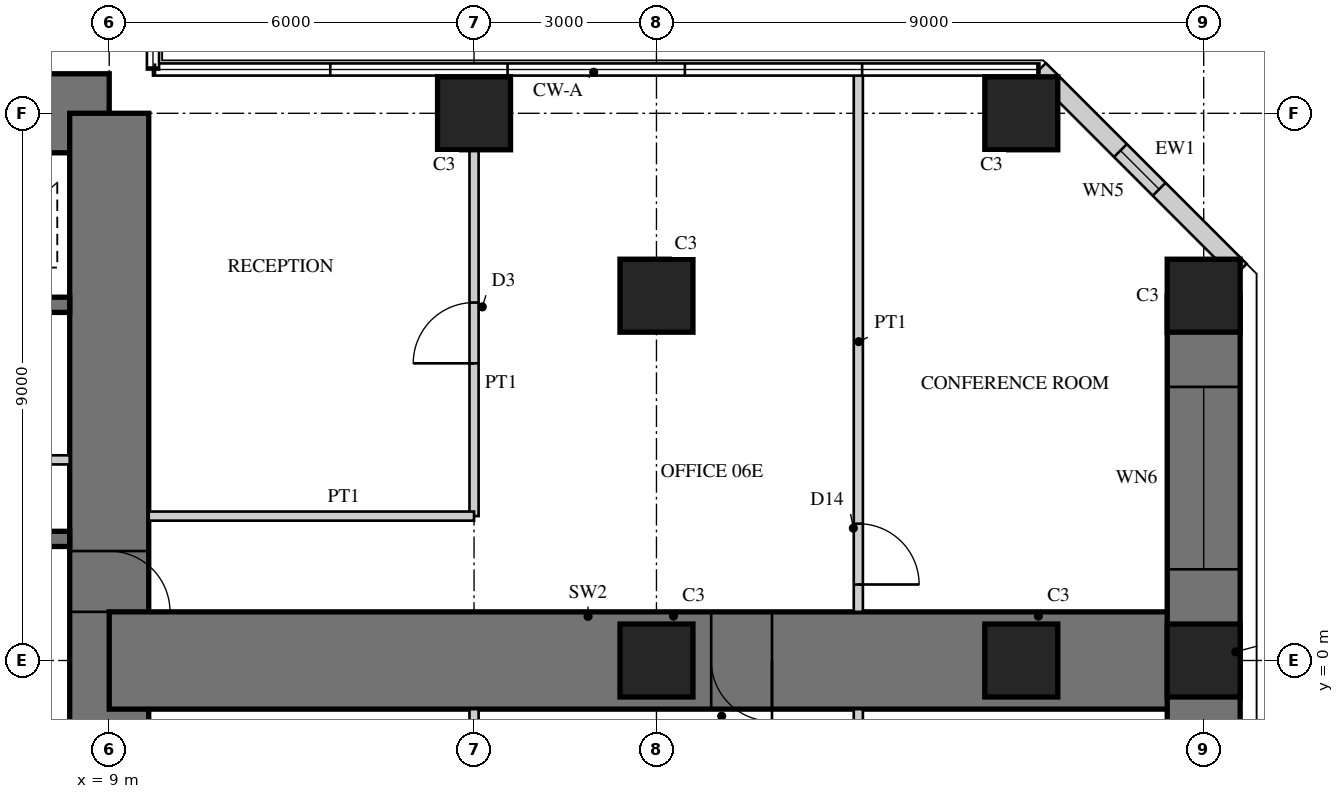
"""IFC4 building model, lengths in metres.
Left out: names, types, materials, properties, quantities, classifications, styles, units other than length and angle.
Written with IfcOpenShell. Run it as: python <this file> out.ifc"""

import sys

from ifc_helpers import new_model, si_unit, direction, frame, frame_2d, origin, origin_2d, place, context, subcontext, project, spatial, rectangle, hollow_rectangle, extrude, element, fill, save


model = new_model("IFC4")
c1 = context("Model", 3, precision=1e-05, world=origin(), true_north=direction((0.0, 1.0)))
c2 = subcontext(c1, "Body", "Model", "MODEL_VIEW")
j1 = project(units=[si_unit("LENGTHUNIT", "METRE"), si_unit("PLANEANGLEUNIT", "RADIAN")], contexts=[c1])
p1 = place(None, origin())
s1 = spatial("IfcSite", under=j1, at=p1, CompositionType="ELEMENT")
p2 = place(p1, origin())
s2 = spatial("IfcBuilding", under=s1, at=p2, CompositionType="ELEMENT")
p3 = place(p2, frame((0.0, 0.0, 27.5)))
s3 = spatial("IfcBuildingStorey", under=s2, at=p3, CompositionType="ELEMENT", Elevation=27.5)
p4 = place(p3, frame((9.0, 9.0, 0.0), z_axis=(0.0, 0.0, 1.0), x_axis=(-1.0, 0.0, 0.0)))
e1 = element("IfcWall", 1, at=p4, inside=s3, PredefinedType="SHEAR", context=c2, shape_type="SweptSolid", body=[
    extrude(rectangle(XDim=18.0, YDim=1.3, at=frame_2d((9.0, 0.0))), origin(), (0.0, 0.0, 1.0), 4.0),
])
p5 = place(p4, frame((9.8, 0.0, 0.0)))
e2 = element("IfcOpeningElement", 2, at=p5, cuts=e1, PredefinedType="OPENING", context=c2, shape_type="SweptSolid", body=[
    extrude(rectangle(XDim=1.0, YDim=2.4, at=frame_2d((0.5, 1.2))), frame((0.0, 0.66, 0.0), z_axis=(0.0, -1.0, 0.0), x_axis=(1.0, 0.0, 0.0)), (0.0, 0.0, 1.0), 1.32),
])
p6 = place(p3, frame((9.0, -9.0, 0.0), z_axis=(0.0, 0.0, 1.0), x_axis=(0.0, 1.0, 0.0)))
e3 = element("IfcWall", 3, at=p6, inside=s3, PredefinedType="SHEAR", context=c2, shape_type="SweptSolid", body=[
    extrude(rectangle(XDim=18.0, YDim=1.3, at=frame_2d((9.0, 0.0))), origin(), (0.0, 0.0, 1.0), 4.0),
])
p7 = place(p6, frame((9.8, 0.0, 0.0)))
e4 = element("IfcOpeningElement", 4, at=p7, cuts=e3, PredefinedType="OPENING", context=c2, shape_type="SweptSolid", body=[
    extrude(rectangle(XDim=1.0, YDim=2.4, at=frame_2d((0.5, 1.2))), frame((0.0, 0.66, 0.0), z_axis=(0.0, -1.0, 0.0), x_axis=(1.0, 0.0, 0.0)), (0.0, 0.0, 1.0), 1.32),
])
p8 = place(p3, frame((1.925, 2.0, 0.0), z_axis=(0.0, 0.0, 1.0), x_axis=(1.0, 0.0, 0.0)))
e5 = element("IfcWall", 5, at=p8, inside=s3, PredefinedType="SHEAR", context=c2, shape_type="SweptSolid", body=[
    extrude(rectangle(XDim=6.425, YDim=0.25, at=frame_2d((3.212, 0.0))), origin(), (0.0, 0.0, 1.0), 4.0),
])
p9 = place(p3, frame((1.925, 5.85, 0.0), z_axis=(0.0, 0.0, 1.0), x_axis=(1.0, 0.0, 0.0)))
e6 = element("IfcWall", 6, at=p9, inside=s3, PredefinedType="SHEAR", context=c2, shape_type="SweptSolid", body=[
    extrude(rectangle(XDim=6.425, YDim=0.25, at=frame_2d((3.212, 0.0))), origin(), (0.0, 0.0, 1.0), 4.0),
])
p10 = place(p9, frame((0.454, 0.0, 0.0)))
e7 = element("IfcOpeningElement", 7, at=p10, cuts=e6, PredefinedType="OPENING", context=c2, shape_type="SweptSolid", body=[
    extrude(rectangle(XDim=1.1, YDim=2.2, at=frame_2d((0.55, 1.1))), frame((0.0, 0.135, 0.0), z_axis=(0.0, -1.0, 0.0), x_axis=(1.0, 0.0, 0.0)), (0.0, 0.0, 1.0), 0.27),
])
p11 = place(p9, frame((2.663, 0.0, 0.0)))
e8 = element("IfcOpeningElement", 8, at=p11, cuts=e6, PredefinedType="OPENING", context=c2, shape_type="SweptSolid", body=[
    extrude(rectangle(XDim=1.1, YDim=2.2, at=frame_2d((0.55, 1.1))), frame((0.0, 0.135, 0.0), z_axis=(0.0, -1.0, 0.0), x_axis=(1.0, 0.0, 0.0)), (0.0, 0.0, 1.0), 0.27),
])
p12 = place(p9, frame((4.871, 0.0, 0.0)))
e9 = element("IfcOpeningElement", 9, at=p12, cuts=e6, PredefinedType="OPENING", context=c2, shape_type="SweptSolid", body=[
    extrude(rectangle(XDim=1.1, YDim=2.2, at=frame_2d((0.55, 1.1))), frame((0.0, 0.135, 0.0), z_axis=(0.0, -1.0, 0.0), x_axis=(1.0, 0.0, 0.0)), (0.0, 0.0, 1.0), 0.27),
])
p13 = place(p3, frame((1.925, 3.3, 0.0), z_axis=(0.0, 0.0, 1.0), x_axis=(1.0, 0.0, 0.0)))
e10 = element("IfcWall", 10, at=p13, inside=s3, PredefinedType="PARTITIONING", context=c2, shape_type="SweptSolid", body=[
    extrude(rectangle(XDim=6.425, YDim=0.15, at=frame_2d((3.212, 0.0))), origin(), (0.0, 0.0, 1.0), 4.0),
])
p14 = place(p13, frame((0.075, 0.0, 0.0)))
e11 = element("IfcOpeningElement", 11, at=p14, cuts=e10, PredefinedType="OPENING", context=c2, shape_type="SweptSolid", body=[
    extrude(rectangle(XDim=0.8, YDim=2.1, at=frame_2d((0.4, 1.05))), frame((0.0, 0.085, 0.0), z_axis=(0.0, -1.0, 0.0), x_axis=(1.0, 0.0, 0.0)), (0.0, 0.0, 1.0), 0.17),
])
p15 = place(p13, frame((3.675, 0.0, 0.0)))
e12 = element("IfcOpeningElement", 12, at=p15, cuts=e10, PredefinedType="OPENING", context=c2, shape_type="SweptSolid", body=[
    extrude(rectangle(XDim=0.8, YDim=2.1, at=frame_2d((0.4, 1.05))), frame((0.0, 0.085, 0.0), z_axis=(0.0, -1.0, 0.0), x_axis=(1.0, 0.0, 0.0)), (0.0, 0.0, 1.0), 0.17),
])
p16 = place(p3, frame((9.0, 0.0, 0.0), z_axis=(0.0, 0.0, 1.0), x_axis=(1.0, 0.0, 0.0)))
e13 = element("IfcWall", 13, at=p16, inside=s3, PredefinedType="SHEAR", context=c2, shape_type="SweptSolid", body=[
    extrude(rectangle(XDim=18.0, YDim=1.6, at=frame_2d((9.0, 0.0))), origin(), (0.0, 0.0, 1.0), 4.0),
])
p17 = place(p16, frame((9.9, 0.0, 0.0)))
e14 = element("IfcOpeningElement", 14, at=p17, cuts=e13, PredefinedType="OPENING", context=c2, shape_type="SweptSolid", body=[
    extrude(rectangle(XDim=1.0, YDim=2.2, at=frame_2d((0.5, 1.1))), frame((0.0, 0.81, 0.0), z_axis=(0.0, -1.0, 0.0), x_axis=(1.0, 0.0, 0.0)), (0.0, 0.0, 1.0), 1.62),
])
p18 = place(p3, frame((27.0, -6.0, 0.0), z_axis=(0.0, 0.0, 1.0), x_axis=(0.0, 1.0, 0.0)))
e15 = element("IfcWall", 15, at=p18, inside=s3, PredefinedType="SHEAR", context=c2, shape_type="SweptSolid", body=[
    extrude(rectangle(XDim=12.0, YDim=1.2, at=frame_2d((6.0, 0.0))), origin(), (0.0, 0.0, 1.0), 4.0),
])
p19 = place(p18, frame((1.5, 0.0, 0.6)))
e16 = element("IfcOpeningElement", 16, at=p19, cuts=e15, PredefinedType="OPENING", context=c2, shape_type="SweptSolid", body=[
    extrude(rectangle(XDim=3.0, YDim=2.4, at=frame_2d((1.5, 1.2))), frame((0.0, 0.61, 0.0), z_axis=(0.0, -1.0, 0.0), x_axis=(1.0, 0.0, 0.0)), (0.0, 0.0, 1.0), 1.22),
])
p20 = place(p18, frame((7.5, 0.0, 0.6)))
e17 = element("IfcOpeningElement", 17, at=p20, cuts=e15, PredefinedType="OPENING", context=c2, shape_type="SweptSolid", body=[
    extrude(rectangle(XDim=3.0, YDim=2.4, at=frame_2d((1.5, 1.2))), frame((0.0, 0.61, 0.0), z_axis=(0.0, -1.0, 0.0), x_axis=(1.0, 0.0, 0.0)), (0.0, 0.0, 1.0), 1.22),
])
for number, where, z_axis, x_axis in (
    (18, (15.0, 9.0, 0.0), (0.0, 0.0, 1.0), (1.0, 0.0, 0.0)),
    (19, (24.0, 9.0, 0.0), (0.0, 0.0, 1.0), (1.0, 0.0, 0.0)),
    (20, (27.0, 0.0, 0.0), (0.0, 0.0, 1.0), (1.0, 0.0, 0.0)),
    (21, (27.0, 6.0, 0.0), (0.0, 0.0, 1.0), (1.0, 0.0, 0.0)),
    (22, (18.0, 0.0, 0.0), (0.0, 0.0, 1.0), (1.0, 0.0, 0.0)),
    (23, (18.0, 6.0, 0.0), (0.0, 0.0, 1.0), (1.0, 0.0, 0.0)),
    (24, (24.0, 0.0, 0.0), (0.0, 0.0, 1.0), (1.0, 0.0, 0.0)),
):
    element("IfcColumn", number, at=place(p3, frame(where, z_axis=z_axis, x_axis=x_axis)), inside=s3, PredefinedType="COLUMN", context=c2, shape_type="SweptSolid", body=[
        extrude(rectangle(XDim=1.2, YDim=1.2, at=origin_2d()), origin(), (0.0, 0.0, 1.0), 4.0),
    ])
p21 = place(p3, frame((27.6, 6.418, 0.0), z_axis=(0.0, 0.0, 1.0), x_axis=(-0.707106781187, 0.707106781187, 0.0)))
e25 = element("IfcWall", 25, at=p21, inside=s3, PredefinedType="SOLIDWALL", context=c2, shape_type="SweptSolid", body=[
    extrude(rectangle(XDim=4.669, YDim=0.3, at=frame_2d((2.335, 0.0))), origin(), (0.0, 0.0, 1.0), 3.8),
])
p22 = place(p21, frame((1.885, 0.0, 0.3)))
e26 = element("IfcOpeningElement", 26, at=p22, cuts=e25, PredefinedType="OPENING", context=c2, shape_type="SweptSolid", body=[
    extrude(rectangle(XDim=0.9, YDim=2.4, at=frame_2d((0.45, 1.2))), frame((0.0, 0.16, 0.0), z_axis=(0.0, -1.0, 0.0), x_axis=(1.0, 0.0, 0.0)), (0.0, 0.0, 1.0), 0.32),
])
p23 = place(p3, frame((15.0, 2.375, 0.0), z_axis=(0.0, 0.0, 1.0), x_axis=(0.0, 1.0, 0.0)))
e27 = element("IfcWall", 27, at=p23, inside=s3, PredefinedType="PARTITIONING", context=c2, shape_type="SweptSolid", body=[
    extrude(rectangle(XDim=6.025, YDim=0.15, at=frame_2d((3.012, 0.0))), origin(), (0.0, 0.0, 1.0), 2.95),
])
p24 = place(p23, frame((2.512, 0.0, 0.0)))
e28 = element("IfcOpeningElement", 28, at=p24, cuts=e27, PredefinedType="OPENING", context=c2, shape_type="SweptSolid", body=[
    extrude(rectangle(XDim=1.0, YDim=2.1, at=frame_2d((0.5, 1.05))), frame((0.0, 0.085, 0.0), z_axis=(0.0, -1.0, 0.0), x_axis=(1.0, 0.0, 0.0)), (0.0, 0.0, 1.0), 0.17),
])
p25 = place(p3, frame((9.65, 2.375, 0.0), z_axis=(0.0, 0.0, 1.0), x_axis=(1.0, 0.0, 0.0)))
e29 = element("IfcWall", 29, at=p25, inside=s3, PredefinedType="PARTITIONING", context=c2, shape_type="SweptSolid", body=[
    extrude(rectangle(XDim=5.35, YDim=0.15, at=frame_2d((2.675, 0.0))), origin(), (0.0, 0.0, 1.0), 3.8),
])
p26 = place(p3, frame((15.0, -8.4, 0.0), z_axis=(0.0, 0.0, 1.0), x_axis=(0.0, 1.0, 0.0)))
e30 = element("IfcWall", 30, at=p26, inside=s3, PredefinedType="PARTITIONING", context=c2, shape_type="SweptSolid", body=[
    extrude(rectangle(XDim=7.6, YDim=0.15, at=frame_2d((3.8, 0.0))), origin(), (0.0, 0.0, 1.0), 2.95),
])
p27 = place(p26, frame((1.375, 0.0, 0.0)))
e31 = element("IfcOpeningElement", 31, at=p27, cuts=e30, PredefinedType="OPENING", context=c2, shape_type="SweptSolid", body=[
    extrude(rectangle(XDim=1.0, YDim=2.1, at=frame_2d((0.5, 1.05))), frame((0.0, 0.085, 0.0), z_axis=(0.0, -1.0, 0.0), x_axis=(1.0, 0.0, 0.0)), (0.0, 0.0, 1.0), 0.17),
])
p28 = place(p26, frame((5.175, 0.0, 0.0)))
e32 = element("IfcOpeningElement", 32, at=p28, cuts=e30, PredefinedType="OPENING", context=c2, shape_type="SweptSolid", body=[
    extrude(rectangle(XDim=1.0, YDim=2.1, at=frame_2d((0.5, 1.05))), frame((0.0, 0.085, 0.0), z_axis=(0.0, -1.0, 0.0), x_axis=(1.0, 0.0, 0.0)), (0.0, 0.0, 1.0), 0.17),
])
p29 = place(p3, frame((21.32, 0.8, 0.0), z_axis=(0.0, 0.0, 1.0), x_axis=(0.0, 1.0, 0.0)))
e33 = element("IfcWall", 33, at=p29, inside=s3, PredefinedType="PARTITIONING", context=c2, shape_type="SweptSolid", body=[
    extrude(rectangle(XDim=8.88, YDim=0.15, at=frame_2d((4.44, 0.0))), origin(), (0.0, 0.0, 1.0), 3.8),
])
p30 = place(p29, frame((0.45, 0.0, 0.0)))
e34 = element("IfcOpeningElement", 34, at=p30, cuts=e33, PredefinedType="OPENING", context=c2, shape_type="SweptSolid", body=[
    extrude(rectangle(XDim=1.0, YDim=2.2, at=frame_2d((0.5, 1.1))), frame((0.0, 0.085, 0.0), z_axis=(0.0, -1.0, 0.0), x_axis=(1.0, 0.0, 0.0)), (0.0, 0.0, 1.0), 0.17),
])
p31 = place(p3, frame((21.32, -9.68, 0.0), z_axis=(0.0, 0.0, 1.0), x_axis=(0.0, 1.0, 0.0)))
e35 = element("IfcWall", 35, at=p31, inside=s3, PredefinedType="PARTITIONING", context=c2, shape_type="SweptSolid", body=[
    extrude(rectangle(XDim=8.88, YDim=0.15, at=frame_2d((4.44, 0.0))), origin(), (0.0, 0.0, 1.0), 3.8),
])
p32 = place(p31, frame((5.087, 0.0, 0.0)))
e36 = element("IfcOpeningElement", 36, at=p32, cuts=e35, PredefinedType="OPENING", context=c2, shape_type="SweptSolid", body=[
    extrude(rectangle(XDim=1.0, YDim=2.2, at=frame_2d((0.5, 1.1))), frame((0.0, 0.085, 0.0), z_axis=(0.0, -1.0, 0.0), x_axis=(1.0, 0.0, 0.0)), (0.0, 0.0, 1.0), 0.17),
])
p33 = place(p31, frame((7.53, 0.0, 0.0)))
e37 = element("IfcOpeningElement", 37, at=p33, cuts=e35, PredefinedType="OPENING", context=c2, shape_type="SweptSolid", body=[
    extrude(rectangle(XDim=1.0, YDim=2.2, at=frame_2d((0.5, 1.1))), frame((0.0, 0.085, 0.0), z_axis=(0.0, -1.0, 0.0), x_axis=(1.0, 0.0, 0.0)), (0.0, 0.0, 1.0), 0.17),
])
p34 = place(p20, origin())
e38 = element("IfcWindow", 38, at=p34, inside=s3, PartitioningType="SINGLE_PANEL", PredefinedType="WINDOW", context=c2, shape_type="SweptSolid", body=[
    extrude(hollow_rectangle(XDim=3.0, YDim=2.4, WallThickness=0.06, at=frame_2d((1.5, 1.2))), frame((0.0, 0.03, 0.0), z_axis=(0.0, -1.0, 0.0), x_axis=(1.0, 0.0, 0.0)), (0.0, 0.0, 1.0), 0.06),
    extrude(rectangle(XDim=2.879, YDim=2.279, at=frame_2d((1.5, 1.2))), frame((0.0, 0.03, 0.0), z_axis=(0.0, -1.0, 0.0), x_axis=(1.0, 0.0, 0.0)), (0.0, 0.0, 1.0), 0.06),
])
fill(e17, e38)
p35 = place(p22, origin())
e39 = element("IfcWindow", 39, at=p35, inside=s3, PartitioningType="SINGLE_PANEL", PredefinedType="WINDOW", context=c2, shape_type="SweptSolid", body=[
    extrude(hollow_rectangle(XDim=0.9, YDim=2.4, WallThickness=0.06, at=frame_2d((0.45, 1.2))), frame((0.0, 0.03, 0.0), z_axis=(0.0, -1.0, 0.0), x_axis=(1.0, 0.0, 0.0)), (0.0, 0.0, 1.0), 0.06),
    extrude(rectangle(XDim=0.779, YDim=2.279, at=frame_2d((0.45, 1.2))), frame((0.0, 0.03, 0.0), z_axis=(0.0, -1.0, 0.0), x_axis=(1.0, 0.0, 0.0)), (0.0, 0.0, 1.0), 0.06),
])
fill(e26, e39)
p36 = place(p24, origin())
e40 = element("IfcDoor", 40, at=p36, inside=s3, OperationType="SINGLE_SWING_LEFT", PredefinedType="DOOR", context=c2, shape_type="SweptSolid", body=[
    extrude(rectangle(XDim=1.0, YDim=2.1, at=frame_2d((0.5, 1.05))), frame((0.0, 0.025, 0.0), z_axis=(0.0, -1.0, 0.0), x_axis=(1.0, 0.0, 0.0)), (0.0, 0.0, 1.0), 0.05),
])
fill(e28, e40)
p37 = place(p30, frame((1.0, 0.0, 0.0), z_axis=(0.0, 0.0, 1.0), x_axis=(-1.0, 0.0, 0.0)))
e41 = element("IfcDoor", 41, at=p37, inside=s3, OperationType="SINGLE_SWING_RIGHT", PredefinedType="DOOR", context=c2, shape_type="SweptSolid", body=[
    extrude(rectangle(XDim=1.0, YDim=2.2, at=frame_2d((0.5, 1.1))), frame((0.0, 0.025, 0.0), z_axis=(0.0, -1.0, 0.0), x_axis=(1.0, 0.0, 0.0)), (0.0, 0.0, 1.0), 0.05),
])
fill(e34, e41)
p38 = place(p17, frame((1.0, 0.0, 0.0), z_axis=(0.0, 0.0, 1.0), x_axis=(-1.0, 0.0, 0.0)))
e42 = element("IfcDoor", 42, at=p38, inside=s3, OperationType="SINGLE_SWING_LEFT", PredefinedType="DOOR", context=c2, shape_type="SweptSolid", body=[
    extrude(rectangle(XDim=1.0, YDim=2.2, at=frame_2d((0.5, 1.1))), frame((0.0, 0.025, 0.0), z_axis=(0.0, -1.0, 0.0), x_axis=(1.0, 0.0, 0.0)), (0.0, 0.0, 1.0), 0.05),
])
fill(e14, e42)
p39 = place(p7, frame((1.0, 0.0, 0.0), z_axis=(0.0, 0.0, 1.0), x_axis=(-1.0, 0.0, 0.0)))
e43 = element("IfcDoor", 43, at=p39, inside=s3, OperationType="SINGLE_SWING_RIGHT", PredefinedType="DOOR", context=c2, shape_type="SweptSolid", body=[
    extrude(rectangle(XDim=1.0, YDim=2.4, at=frame_2d((0.5, 1.2))), frame((0.0, -0.005, 0.0), z_axis=(0.0, -1.0, 0.0), x_axis=(1.0, 0.0, 0.0)), (0.0, 0.0, 1.0), 0.05),
])
fill(e4, e43)
save(model, sys.argv[1])
